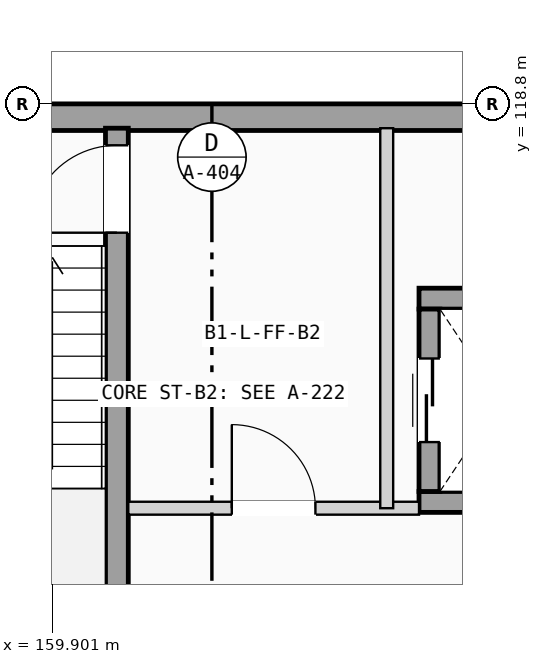
"""IFC4 building model, lengths in metres.
Left out: names, types, materials, properties, quantities, classifications, styles, units other than length and angle.
Written with IfcOpenShell. Run it as: python <this file> out.ifc"""

import sys

from ifc_helpers import new_model, si_unit, direction, frame, frame_2d, origin, place, context, subcontext, project, spatial, rectangle, extrude, element, fill, save


model = new_model("IFC4")
c1 = context("Model", 3, precision=1e-05, world=origin(), true_north=direction((0.0, 1.0)))
c2 = subcontext(c1, "Body", "Model", "MODEL_VIEW")
j1 = project(units=[si_unit("LENGTHUNIT", "METRE"), si_unit("PLANEANGLEUNIT", "RADIAN")], contexts=[c1])
p1 = place(None, origin())
s1 = spatial("IfcSite", under=j1, at=p1, CompositionType="ELEMENT")
p2 = place(p1, origin())
s2 = spatial("IfcBuilding", under=s1, at=p2, CompositionType="ELEMENT")
p3 = place(p2, frame((0.0, 0.0, -4.2)))
s3 = spatial("IfcBuildingStorey", under=s2, at=p3, CompositionType="ELEMENT", Elevation=-4.2)
p4 = place(p3, frame((0.0, 118.625, 0.0), z_axis=(0.0, 0.0, 1.0), x_axis=(1.0, 0.0, 0.0)))
e1 = element("IfcWall", 1, at=p4, inside=s3, PredefinedType="SOLIDWALL", context=c2, shape_type="SweptSolid", body=[
    extrude(rectangle(XDim=172.8, YDim=0.35, at=frame_2d((86.4, 0.0))), origin(), (0.0, 0.0, 1.0), 3.92),
])
p5 = place(p3, frame((160.75, 111.48, 0.0), z_axis=(0.0, 0.0, 1.0), x_axis=(0.0, 1.0, 0.0)))
e2 = element("IfcWall", 2, at=p5, inside=s3, PredefinedType="SHEAR", context=c2, shape_type="SweptSolid", body=[
    extrude(rectangle(XDim=7.0, YDim=0.3, at=frame_2d((3.5, 0.0))), origin(), (0.0, 0.0, 1.0), 3.92),
])
p6 = place(p5, frame((5.625, 0.0, 0.0)))
e3 = element("IfcOpeningElement", 3, at=p6, cuts=e2, PredefinedType="OPENING", context=c2, shape_type="SweptSolid", body=[
    extrude(rectangle(XDim=1.15, YDim=2.12, at=frame_2d((0.575, 1.06))), frame((0.0, 0.16, 0.0), z_axis=(0.0, -1.0, 0.0), x_axis=(1.0, 0.0, 0.0)), (0.0, 0.0, 1.0), 0.32),
])
for number, where, z_axis, x_axis in (
    (4, (164.725, 113.562, 0.0), (0.0, 0.0, 1.0), (1.0, 0.0, 0.0)),
    (5, (164.725, 116.238, 0.0), (0.0, 0.0, 1.0), (1.0, 0.0, 0.0)),
):
    element("IfcWall", number, at=place(p3, frame(where, z_axis=z_axis, x_axis=x_axis)), inside=s3, PredefinedType="SHEAR", context=c2, shape_type="SweptSolid", body=[
        extrude(rectangle(XDim=2.15, YDim=0.275, at=frame_2d((1.075, 0.0))), origin(), (0.0, 0.0, 1.0), 3.92),
    ])
p7 = place(p3, frame((164.863, 113.7, 0.0), z_axis=(0.0, 0.0, 1.0), x_axis=(0.0, 1.0, 0.0)))
e6 = element("IfcWall", 6, at=p7, inside=s3, PredefinedType="SHEAR", context=c2, shape_type="SweptSolid", body=[
    extrude(rectangle(XDim=2.4, YDim=0.275, at=frame_2d((1.2, 0.0))), origin(), (0.0, 0.0, 1.0), 3.92),
])
p8 = place(p7, frame((0.65, 0.0, 0.0)))
e7 = element("IfcOpeningElement", 7, at=p8, cuts=e6, PredefinedType="OPENING", context=c2, shape_type="SweptSolid", body=[
    extrude(rectangle(XDim=1.1, YDim=2.15, at=frame_2d((0.55, 1.075))), frame((0.0, 0.147, 0.0), z_axis=(0.0, -1.0, 0.0), x_axis=(1.0, 0.0, 0.0)), (0.0, 0.0, 1.0), 0.295),
])
p9 = place(p3, frame((160.9, 113.48, 0.0), z_axis=(0.0, 0.0, 1.0), x_axis=(1.0, 0.0, 0.0)))
e8 = element("IfcWall", 8, at=p9, inside=s3, PredefinedType="PARTITIONING", context=c2, shape_type="SweptSolid", body=[
    extrude(rectangle(XDim=3.825, YDim=0.17, at=frame_2d((1.913, 0.0))), origin(), (0.0, 0.0, 1.0), 3.84),
])
p10 = place(p9, frame((1.362, 0.0, 0.0)))
e9 = element("IfcOpeningElement", 9, at=p10, cuts=e8, PredefinedType="OPENING", context=c2, shape_type="SweptSolid", body=[
    extrude(rectangle(XDim=1.1, YDim=2.12, at=frame_2d((0.55, 1.06))), frame((0.0, 0.095, 0.0), z_axis=(0.0, -1.0, 0.0), x_axis=(1.0, 0.0, 0.0)), (0.0, 0.0, 1.0), 0.19),
])
p11 = place(p3, frame((164.3, 113.48, 0.0), z_axis=(0.0, 0.0, 1.0), x_axis=(0.0, 1.0, 0.0)))
e10 = element("IfcWall", 10, at=p11, inside=s3, PredefinedType="PARTITIONING", context=c2, shape_type="SweptSolid", body=[
    extrude(rectangle(XDim=5.0, YDim=0.17, at=frame_2d((2.5, 0.0))), origin(), (0.0, 0.0, 1.0), 3.84),
])
p12 = place(p6, origin())
e11 = element("IfcDoor", 11, at=p12, inside=s3, OperationType="SINGLE_SWING_LEFT", PredefinedType="DOOR", context=c2, shape_type="SweptSolid", body=[
    extrude(rectangle(XDim=1.15, YDim=2.12, at=frame_2d((0.575, 1.06))), frame((0.0, 0.025, 0.0), z_axis=(0.0, -1.0, 0.0), x_axis=(1.0, 0.0, 0.0)), (0.0, 0.0, 1.0), 0.05),
])
fill(e3, e11)
p13 = place(p8, origin())
e12 = element("IfcDoor", 12, at=p13, inside=s3, OperationType="SLIDING_TO_LEFT", PredefinedType="DOOR", context=c2, shape_type="SweptSolid", body=[
    extrude(rectangle(XDim=1.1, YDim=2.15, at=frame_2d((0.55, 1.075))), frame((0.0, 0.025, 0.0), z_axis=(0.0, -1.0, 0.0), x_axis=(1.0, 0.0, 0.0)), (0.0, 0.0, 1.0), 0.05),
])
fill(e7, e12)
p14 = place(p10, origin())
e13 = element("IfcDoor", 13, at=p14, inside=s3, OperationType="SINGLE_SWING_LEFT", PredefinedType="DOOR", context=c2, shape_type="SweptSolid", body=[
    extrude(rectangle(XDim=1.1, YDim=2.12, at=frame_2d((0.55, 1.06))), frame((0.0, 0.025, 0.0), z_axis=(0.0, -1.0, 0.0), x_axis=(1.0, 0.0, 0.0)), (0.0, 0.0, 1.0), 0.05),
])
fill(e9, e13)
save(model, sys.argv[1])
